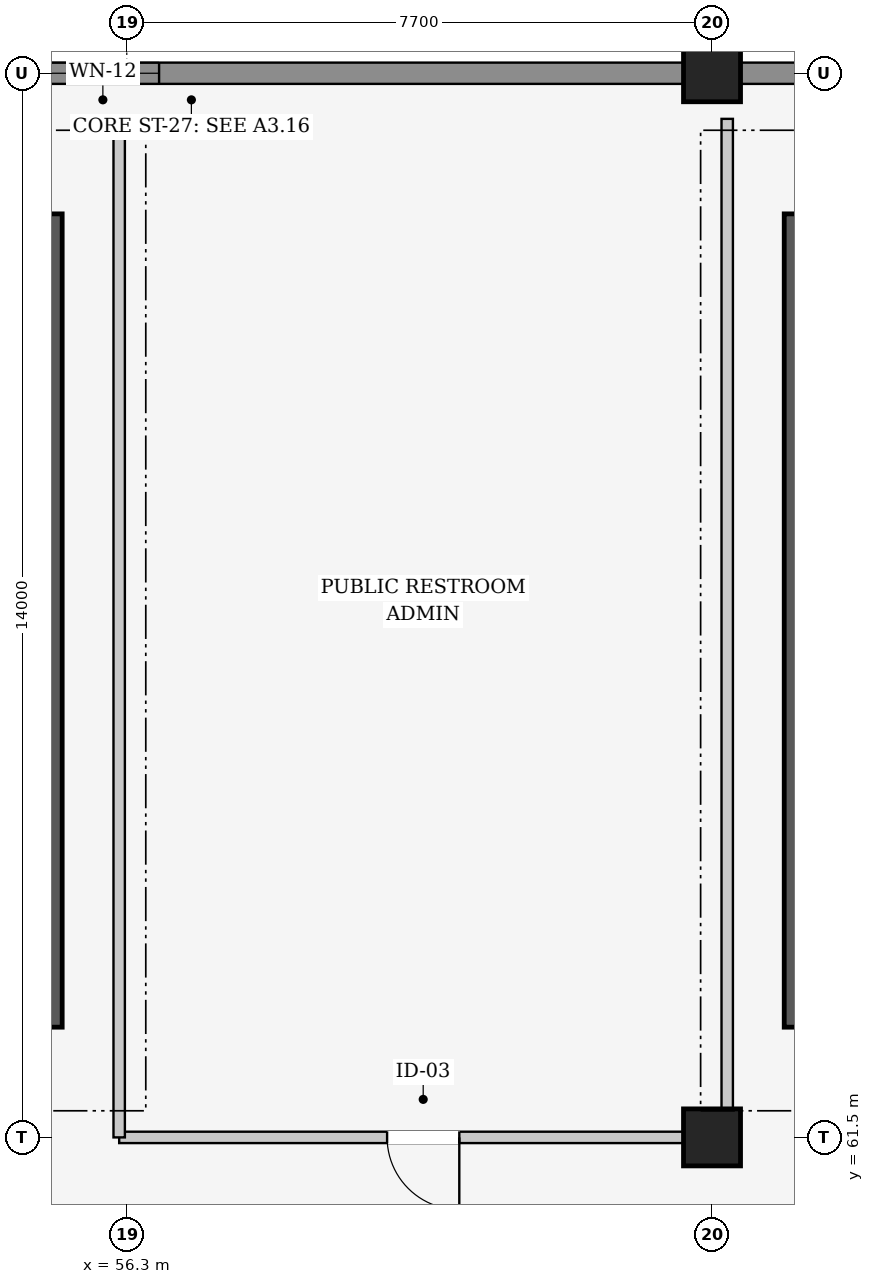
"""IFC4 building model, lengths in metres.
Left out: names, types, materials, properties, quantities, classifications, styles, units other than length and angle.
Written with IfcOpenShell. Run it as: python <this file> out.ifc"""

import sys

from ifc_helpers import new_model, si_unit, direction, frame, frame_2d, origin, origin_2d, place, context, subcontext, project, spatial, rectangle, extrude, element, fill, save


model = new_model("IFC4")
c1 = context("Model", 3, precision=1e-05, world=origin(), true_north=direction((0.0, 1.0)))
c2 = subcontext(c1, "Body", "Model", "MODEL_VIEW")
j1 = project(units=[si_unit("LENGTHUNIT", "METRE"), si_unit("PLANEANGLEUNIT", "RADIAN")], contexts=[c1])
p1 = place(None, origin())
s1 = spatial("IfcSite", under=j1, at=p1, CompositionType="ELEMENT")
p2 = place(p1, origin())
s2 = spatial("IfcBuilding", under=s1, at=p2, CompositionType="ELEMENT")
p3 = place(p2, frame((0.0, 0.0, 11.4)))
s3 = spatial("IfcBuildingStorey", under=s2, at=p3, CompositionType="ELEMENT", Elevation=11.4)
for number, where, z_axis, x_axis in (
    (1, (64.0, 61.5, 0.0), (0.0, 0.0, 1.0), (1.0, 0.0, 0.0)),
    (2, (64.0, 75.5, 0.0), (0.0, 0.0, 1.0), (1.0, 0.0, 0.0)),
):
    element("IfcColumn", number, at=place(p3, frame(where, z_axis=z_axis, x_axis=x_axis)), inside=s3, PredefinedType="COLUMN", context=c2, shape_type="SweptSolid", body=[
        extrude(rectangle(XDim=0.75, YDim=0.75, at=origin_2d()), origin(), (0.0, 0.0, 1.0), 4.8),
    ])
p4 = place(p3, frame((48.357, 75.5, 0.0), z_axis=(0.0, 0.0, 1.0), x_axis=(1.0, 0.0, 0.0)))
e3 = element("IfcWall", 3, at=p4, inside=s3, PredefinedType="SOLIDWALL", context=c2, shape_type="SweptSolid", body=[
    extrude(rectangle(XDim=15.286, YDim=0.28, at=frame_2d((7.643, 0.0))), origin(), (0.0, 0.0, 1.0), 3.52),
])
p5 = place(p4, frame((6.918, 0.0, 0.95)))
e4 = element("IfcOpeningElement", 4, at=p5, cuts=e3, PredefinedType="OPENING", context=c2, shape_type="SweptSolid", body=[
    extrude(rectangle(XDim=1.45, YDim=1.5, at=frame_2d((0.725, 0.75))), frame((0.0, 0.15, 0.0), z_axis=(0.0, -1.0, 0.0), x_axis=(1.0, 0.0, 0.0)), (0.0, 0.0, 1.0), 0.3),
])
p6 = place(p3, frame((64.357, 75.5, 0.0), z_axis=(0.0, 0.0, 1.0), x_axis=(1.0, 0.0, 0.0)))
e5 = element("IfcWall", 5, at=p6, inside=s3, PredefinedType="SOLIDWALL", context=c2, shape_type="SweptSolid", body=[
    extrude(rectangle(XDim=7.286, YDim=0.28, at=frame_2d((3.643, 0.0))), origin(), (0.0, 0.0, 1.0), 3.72),
])
p7 = place(p6, frame((2.818, 0.0, 0.95)))
e6 = element("IfcOpeningElement", 6, at=p7, cuts=e5, PredefinedType="OPENING", context=c2, shape_type="SweptSolid", body=[
    extrude(rectangle(XDim=1.65, YDim=1.5, at=frame_2d((0.825, 0.75))), frame((0.0, 0.15, 0.0), z_axis=(0.0, -1.0, 0.0), x_axis=(1.0, 0.0, 0.0)), (0.0, 0.0, 1.0), 0.3),
])
p8 = place(p3, frame((55.325, 73.65, 0.0), z_axis=(0.0, 0.0, 1.0), x_axis=(0.0, -1.0, 0.0)))
e7 = element("IfcWall", 7, at=p8, inside=s3, PredefinedType="SHEAR", context=c2, shape_type="SweptSolid", body=[
    extrude(rectangle(XDim=10.7, YDim=0.25, at=frame_2d((5.35, 0.0))), origin(), (0.0, 0.0, 1.0), 4.8),
])
p9 = place(p3, frame((65.075, 62.95, 0.0), z_axis=(0.0, 0.0, 1.0), x_axis=(0.0, 1.0, 0.0)))
e8 = element("IfcWall", 8, at=p9, inside=s3, PredefinedType="SHEAR", context=c2, shape_type="SweptSolid", body=[
    extrude(rectangle(XDim=10.7, YDim=0.25, at=frame_2d((5.35, 0.0))), origin(), (0.0, 0.0, 1.0), 3.6),
])
p10 = place(p3, frame((64.2, 61.5, 0.0), z_axis=(0.0, 0.0, 1.0), x_axis=(-1.0, 0.0, 0.0)))
e9 = element("IfcWall", 9, at=p10, inside=s3, PredefinedType="PARTITIONING", context=c2, shape_type="SweptSolid", body=[
    extrude(rectangle(XDim=8.0, YDim=0.15, at=frame_2d((4.0, 0.0))), origin(), (0.0, 0.0, 1.0), 3.505),
])
p11 = place(p10, frame((3.525, 0.0, 0.0)))
e10 = element("IfcOpeningElement", 10, at=p11, cuts=e9, PredefinedType="OPENING", context=c2, shape_type="SweptSolid", body=[
    extrude(rectangle(XDim=0.95, YDim=2.15, at=frame_2d((0.475, 1.075))), frame((0.0, 0.085, 0.0), z_axis=(0.0, -1.0, 0.0), x_axis=(1.0, 0.0, 0.0)), (0.0, 0.0, 1.0), 0.17),
])
p12 = place(p3, frame((64.2, 74.9, 0.0), z_axis=(0.0, 0.0, 1.0), x_axis=(0.0, -1.0, 0.0)))
e11 = element("IfcWall", 11, at=p12, inside=s3, PredefinedType="PARTITIONING", context=c2, shape_type="SweptSolid", body=[
    extrude(rectangle(XDim=13.4, YDim=0.15, at=frame_2d((6.7, 0.0))), origin(), (0.0, 0.0, 1.0), 3.705),
])
p13 = place(p3, frame((56.2, 61.5, 0.0), z_axis=(0.0, 0.0, 1.0), x_axis=(0.0, 1.0, 0.0)))
e12 = element("IfcWall", 12, at=p13, inside=s3, PredefinedType="PARTITIONING", context=c2, shape_type="SweptSolid", body=[
    extrude(rectangle(XDim=13.4, YDim=0.15, at=frame_2d((6.7, 0.0))), origin(), (0.0, 0.0, 1.0), 3.505),
])
p14 = place(p5, origin())
e13 = element("IfcWindow", 13, at=p14, inside=s3, PartitioningType="SINGLE_PANEL", PredefinedType="WINDOW", context=c2, shape_type="SweptSolid", body=[
    extrude(rectangle(XDim=1.45, YDim=1.5, at=frame_2d((0.725, 0.75))), frame((0.0, 0.03, 0.0), z_axis=(0.0, -1.0, 0.0), x_axis=(1.0, 0.0, 0.0)), (0.0, 0.0, 1.0), 0.06),
])
fill(e4, e13)
p15 = place(p11, origin())
e14 = element("IfcDoor", 14, at=p15, inside=s3, OperationType="SINGLE_SWING_LEFT", PredefinedType="DOOR", context=c2, shape_type="SweptSolid", body=[
    extrude(rectangle(XDim=0.95, YDim=2.15, at=frame_2d((0.475, 1.075))), frame((0.0, 0.025, 0.0), z_axis=(0.0, -1.0, 0.0), x_axis=(1.0, 0.0, 0.0)), (0.0, 0.0, 1.0), 0.05),
])
fill(e10, e14)
save(model, sys.argv[1])
